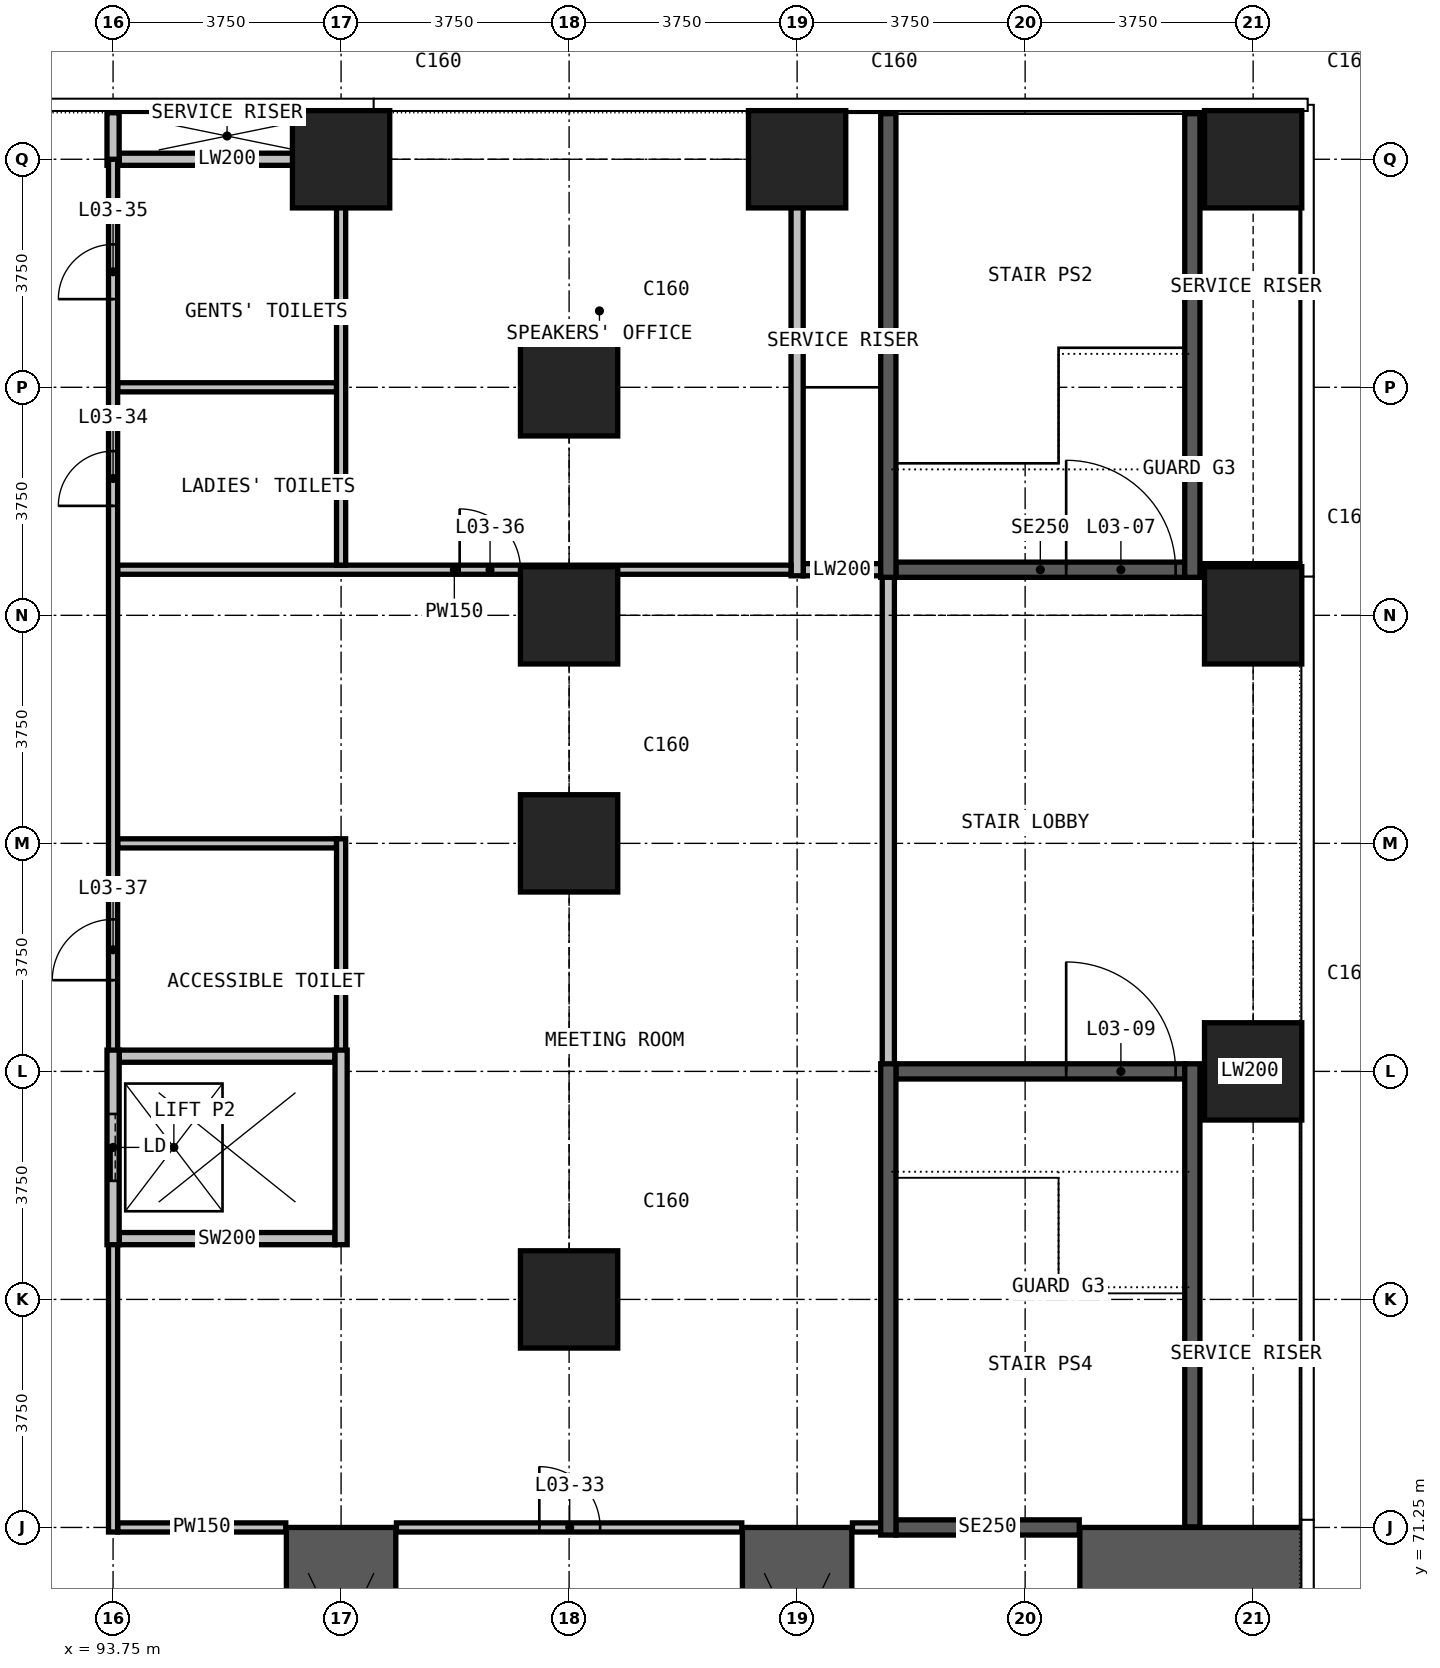
"""IFC4 building model, lengths in metres.
Left out: names, types, materials, properties, quantities, classifications, styles, units other than length and angle.
Written with IfcOpenShell. Run it as: python <this file> out.ifc"""

import sys

from ifc_helpers import new_model, si_unit, direction, frame, frame_2d, origin, origin_2d, place, context, subcontext, project, spatial, rectangle, extrude, element, fill, save


model = new_model("IFC4")
c1 = context("Model", 3, precision=1e-05, world=origin(), true_north=direction((0.0, 1.0)))
c2 = subcontext(c1, "Body", "Model", "MODEL_VIEW")
j1 = project(units=[si_unit("LENGTHUNIT", "METRE"), si_unit("PLANEANGLEUNIT", "RADIAN")], contexts=[c1])
p1 = place(None, origin())
s1 = spatial("IfcSite", under=j1, at=p1, CompositionType="ELEMENT")
p2 = place(p1, origin())
s2 = spatial("IfcBuilding", under=s1, at=p2, CompositionType="ELEMENT")
p3 = place(p2, frame((0.0, 0.0, 24.0)))
s3 = spatial("IfcBuildingStorey", under=s2, at=p3, CompositionType="ELEMENT", Elevation=24.0)
for number, where, z_axis, x_axis in (
    (1, (97.5, 67.5, 0.0), (0.0, 0.0, 1.0), (0.0, 1.0, 0.0)),
    (2, (105.0, 67.5, 0.0), (0.0, 0.0, 1.0), (0.0, 1.0, 0.0)),
):
    element("IfcWall", number, at=place(p3, frame(where, z_axis=z_axis, x_axis=x_axis)), inside=s3, PredefinedType="SHEAR", context=c2, shape_type="SweptSolid", body=[
        extrude(rectangle(XDim=3.75, YDim=1.8, at=frame_2d((1.875, 0.0))), origin(), (0.0, 0.0, 1.0), 6.0),
    ])
p4 = place(p3, frame((111.525, 67.5, 0.0), z_axis=(0.0, 0.0, 1.0), x_axis=(0.0, 1.0, 0.0)))
e3 = element("IfcWall", 3, at=p4, inside=s3, PredefinedType="SHEAR", context=c2, shape_type="SweptSolid", body=[
    extrude(rectangle(XDim=3.75, YDim=3.75, at=frame_2d((1.875, 0.0))), origin(), (0.0, 0.0, 1.0), 6.0),
])
for number, where, z_axis, x_axis in (
    (4, (97.5, 93.75, 0.0), (0.0, 0.0, 1.0), (1.0, 0.0, 0.0)),
    (5, (101.25, 75.0, 0.0), (0.0, 0.0, 1.0), (1.0, 0.0, 0.0)),
    (6, (101.25, 82.5, 0.0), (0.0, 0.0, 1.0), (1.0, 0.0, 0.0)),
    (7, (101.25, 86.25, 0.0), (0.0, 0.0, 1.0), (1.0, 0.0, 0.0)),
    (8, (101.25, 90.0, 0.0), (0.0, 0.0, 1.0), (1.0, 0.0, 0.0)),
    (9, (105.0, 93.75, 0.0), (0.0, 0.0, 1.0), (1.0, 0.0, 0.0)),
    (10, (112.5, 78.75, 0.0), (0.0, 0.0, 1.0), (1.0, 0.0, 0.0)),
    (11, (112.5, 86.25, 0.0), (0.0, 0.0, 1.0), (1.0, 0.0, 0.0)),
    (12, (112.5, 93.75, 0.0), (0.0, 0.0, 1.0), (1.0, 0.0, 0.0)),
):
    element("IfcColumn", number, at=place(p3, frame(where, z_axis=z_axis, x_axis=x_axis)), inside=s3, PredefinedType="COLUMN", context=c2, shape_type="SweptSolid", body=[
        extrude(rectangle(XDim=1.6, YDim=1.6, at=origin_2d()), origin(), (0.0, 0.0, 1.0), 6.0),
    ])
p5 = place(p3, frame((111.625, 78.75, 0.0), z_axis=(0.0, 0.0, 1.0), x_axis=(1.0, 0.0, 0.0)))
e13 = element("IfcWall", 13, at=p5, inside=s3, PredefinedType="PARTITIONING", context=c2, shape_type="SweptSolid", body=[
    extrude(rectangle(XDim=1.64, YDim=0.2, at=frame_2d((0.82, 0.0))), origin(), (0.0, 0.0, 1.0), 5.65),
])
p6 = place(p3, frame((105.1, 87.0, 0.0), z_axis=(0.0, 0.0, 1.0), x_axis=(1.0, 0.0, 0.0)))
e14 = element("IfcWall", 14, at=p6, inside=s3, PredefinedType="PARTITIONING", context=c2, shape_type="SweptSolid", body=[
    extrude(rectangle(XDim=1.275, YDim=0.2, at=frame_2d((0.637, 0.0))), origin(), (0.0, 0.0, 1.0), 5.65),
])
p7 = place(p3, frame((111.625, 87.0, 0.0), z_axis=(0.0, 0.0, 1.0), x_axis=(1.0, 0.0, 0.0)))
e15 = element("IfcWall", 15, at=p7, inside=s3, PredefinedType="PARTITIONING", context=c2, shape_type="SweptSolid", body=[
    extrude(rectangle(XDim=1.64, YDim=0.2, at=frame_2d((0.82, 0.0))), origin(), (0.0, 0.0, 1.0), 5.65),
])
p8 = place(p3, frame((93.85, 93.75, 0.0), z_axis=(0.0, 0.0, 1.0), x_axis=(1.0, 0.0, 0.0)))
e16 = element("IfcWall", 16, at=p8, inside=s3, PredefinedType="PARTITIONING", context=c2, shape_type="SweptSolid", body=[
    extrude(rectangle(XDim=3.55, YDim=0.2, at=frame_2d((1.775, 0.0))), origin(), (0.0, 0.0, 1.0), 5.65),
])
for number, where, z_axis, x_axis in (
    (17, (93.75, 93.65, 0.0), (0.0, 0.0, 1.0), (0.0, 1.0, 0.0)),
    (18, (97.5, 93.65, 0.0), (0.0, 0.0, 1.0), (0.0, 1.0, 0.0)),
):
    element("IfcWall", number, at=place(p3, frame(where, z_axis=z_axis, x_axis=x_axis)), inside=s3, PredefinedType="PARTITIONING", context=c2, shape_type="SweptSolid", body=[
        extrude(rectangle(XDim=0.865, YDim=0.2, at=frame_2d((0.433, 0.0))), origin(), (0.0, 0.0, 1.0), 5.65),
    ])
p9 = place(p3, frame((105.0, 86.9, 0.0), z_axis=(0.0, 0.0, 1.0), x_axis=(0.0, 1.0, 0.0)))
e19 = element("IfcWall", 19, at=p9, inside=s3, PredefinedType="PARTITIONING", context=c2, shape_type="SweptSolid", body=[
    extrude(rectangle(XDim=7.615, YDim=0.2, at=frame_2d((3.808, 0.0))), origin(), (0.0, 0.0, 1.0), 5.65),
])
p10 = place(p3, frame((106.5, 78.625, 0.0), z_axis=(0.0, 0.0, 1.0), x_axis=(0.0, 1.0, 0.0)))
e20 = element("IfcWall", 20, at=p10, inside=s3, PredefinedType="PARTITIONING", context=c2, shape_type="SweptSolid", body=[
    extrude(rectangle(XDim=8.5, YDim=0.2, at=frame_2d((4.25, 0.0))), origin(), (0.0, 0.0, 1.0), 5.65),
])
p11 = place(p3, frame((93.825, 71.25, 0.0), z_axis=(0.0, 0.0, 1.0), x_axis=(1.0, 0.0, 0.0)))
e21 = element("IfcWall", 21, at=p11, inside=s3, PredefinedType="PARTITIONING", context=c2, shape_type="SweptSolid", body=[
    extrude(rectangle(XDim=2.765, YDim=0.15, at=frame_2d((1.383, 0.0))), origin(), (0.0, 0.0, 1.0), 5.65),
])
p12 = place(p3, frame((98.41, 71.25, 0.0), z_axis=(0.0, 0.0, 1.0), x_axis=(1.0, 0.0, 0.0)))
e22 = element("IfcWall", 22, at=p12, inside=s3, PredefinedType="PARTITIONING", context=c2, shape_type="SweptSolid", body=[
    extrude(rectangle(XDim=5.68, YDim=0.15, at=frame_2d((2.84, 0.0))), origin(), (0.0, 0.0, 1.0), 5.65),
])
p13 = place(p12, frame((2.35, 0.0, 0.0)))
e23 = element("IfcOpeningElement", 23, at=p13, cuts=e22, PredefinedType="OPENING", context=c2, shape_type="SweptSolid", body=[
    extrude(rectangle(XDim=1.0, YDim=2.2, at=frame_2d((0.5, 1.1))), frame((0.0, 0.085, 0.0), z_axis=(0.0, -1.0, 0.0), x_axis=(1.0, 0.0, 0.0)), (0.0, 0.0, 1.0), 0.17),
])
p14 = place(p3, frame((105.91, 71.25, 0.0), z_axis=(0.0, 0.0, 1.0), x_axis=(1.0, 0.0, 0.0)))
e24 = element("IfcWall", 24, at=p14, inside=s3, PredefinedType="PARTITIONING", context=c2, shape_type="SweptSolid", body=[
    extrude(rectangle(XDim=0.465, YDim=0.15, at=frame_2d((0.232, 0.0))), origin(), (0.0, 0.0, 1.0), 5.65),
])
p15 = place(p3, frame((93.825, 82.5, 0.0), z_axis=(0.0, 0.0, 1.0), x_axis=(1.0, 0.0, 0.0)))
e25 = element("IfcWall", 25, at=p15, inside=s3, PredefinedType="PARTITIONING", context=c2, shape_type="SweptSolid", body=[
    extrude(rectangle(XDim=3.6, YDim=0.15, at=frame_2d((1.8, 0.0))), origin(), (0.0, 0.0, 1.0), 5.65),
])
p16 = place(p3, frame((93.825, 87.0, 0.0), z_axis=(0.0, 0.0, 1.0), x_axis=(1.0, 0.0, 0.0)))
e26 = element("IfcWall", 26, at=p16, inside=s3, PredefinedType="PARTITIONING", context=c2, shape_type="SweptSolid", body=[
    extrude(rectangle(XDim=11.075, YDim=0.15, at=frame_2d((5.538, 0.0))), origin(), (0.0, 0.0, 1.0), 5.65),
])
p17 = place(p16, frame((5.625, 0.0, 0.0)))
e27 = element("IfcOpeningElement", 27, at=p17, cuts=e26, PredefinedType="OPENING", context=c2, shape_type="SweptSolid", body=[
    extrude(rectangle(XDim=1.0, YDim=2.2, at=frame_2d((0.5, 1.1))), frame((0.0, 0.085, 0.0), z_axis=(0.0, -1.0, 0.0), x_axis=(1.0, 0.0, 0.0)), (0.0, 0.0, 1.0), 0.17),
])
p18 = place(p3, frame((93.825, 90.0, 0.0), z_axis=(0.0, 0.0, 1.0), x_axis=(1.0, 0.0, 0.0)))
e28 = element("IfcWall", 28, at=p18, inside=s3, PredefinedType="PARTITIONING", context=c2, shape_type="SweptSolid", body=[
    extrude(rectangle(XDim=3.6, YDim=0.15, at=frame_2d((1.8, 0.0))), origin(), (0.0, 0.0, 1.0), 5.65),
])
p19 = place(p3, frame((93.75, 71.175, 0.0), z_axis=(0.0, 0.0, 1.0), x_axis=(0.0, 1.0, 0.0)))
e29 = element("IfcWall", 29, at=p19, inside=s3, PredefinedType="PARTITIONING", context=c2, shape_type="SweptSolid", body=[
    extrude(rectangle(XDim=4.925, YDim=0.15, at=frame_2d((2.462, 0.0))), origin(), (0.0, 0.0, 1.0), 5.65),
])
p20 = place(p3, frame((93.75, 78.9, 0.0), z_axis=(0.0, 0.0, 1.0), x_axis=(0.0, 1.0, 0.0)))
e30 = element("IfcWall", 30, at=p20, inside=s3, PredefinedType="PARTITIONING", context=c2, shape_type="SweptSolid", body=[
    extrude(rectangle(XDim=14.85, YDim=0.15, at=frame_2d((7.425, 0.0))), origin(), (0.0, 0.0, 1.0), 5.65),
])
p21 = place(p20, frame((9.15, 0.0, 0.0)))
e31 = element("IfcOpeningElement", 31, at=p21, cuts=e30, PredefinedType="OPENING", context=c2, shape_type="SweptSolid", body=[
    extrude(rectangle(XDim=0.9, YDim=2.2, at=frame_2d((0.45, 1.1))), frame((0.0, 0.085, 0.0), z_axis=(0.0, -1.0, 0.0), x_axis=(1.0, 0.0, 0.0)), (0.0, 0.0, 1.0), 0.17),
])
p22 = place(p20, frame((12.55, 0.0, 0.0)))
e32 = element("IfcOpeningElement", 32, at=p22, cuts=e30, PredefinedType="OPENING", context=c2, shape_type="SweptSolid", body=[
    extrude(rectangle(XDim=0.9, YDim=2.2, at=frame_2d((0.45, 1.1))), frame((0.0, 0.085, 0.0), z_axis=(0.0, -1.0, 0.0), x_axis=(1.0, 0.0, 0.0)), (0.0, 0.0, 1.0), 0.17),
])
p23 = place(p20, frame((1.35, 0.0, 0.0)))
e33 = element("IfcOpeningElement", 33, at=p23, cuts=e30, PredefinedType="OPENING", context=c2, shape_type="SweptSolid", body=[
    extrude(rectangle(XDim=1.0, YDim=2.2, at=frame_2d((0.5, 1.1))), frame((0.0, 0.085, 0.0), z_axis=(0.0, -1.0, 0.0), x_axis=(1.0, 0.0, 0.0)), (0.0, 0.0, 1.0), 0.17),
])
p24 = place(p3, frame((97.5, 78.9, 0.0), z_axis=(0.0, 0.0, 1.0), x_axis=(0.0, 1.0, 0.0)))
e34 = element("IfcWall", 34, at=p24, inside=s3, PredefinedType="PARTITIONING", context=c2, shape_type="SweptSolid", body=[
    extrude(rectangle(XDim=3.675, YDim=0.15, at=frame_2d((1.837, 0.0))), origin(), (0.0, 0.0, 1.0), 5.65),
])
p25 = place(p3, frame((97.5, 87.075, 0.0), z_axis=(0.0, 0.0, 1.0), x_axis=(0.0, 1.0, 0.0)))
e35 = element("IfcWall", 35, at=p25, inside=s3, PredefinedType="PARTITIONING", context=c2, shape_type="SweptSolid", body=[
    extrude(rectangle(XDim=6.675, YDim=0.15, at=frame_2d((3.337, 0.0))), origin(), (0.0, 0.0, 1.0), 5.65),
])
for number, where, z_axis, x_axis in (
    (36, (93.85, 76.0, 0.0), (0.0, 0.0, 1.0), (1.0, 0.0, 0.0)),
    (37, (93.85, 79.0, 0.0), (0.0, 0.0, 1.0), (1.0, 0.0, 0.0)),
):
    element("IfcWall", number, at=place(p3, frame(where, z_axis=z_axis, x_axis=x_axis)), inside=s3, PredefinedType="PARTITIONING", context=c2, shape_type="SweptSolid", body=[
        extrude(rectangle(XDim=3.55, YDim=0.2, at=frame_2d((1.775, 0.0))), origin(), (0.0, 0.0, 1.0), 5.65),
    ])
p26 = place(p3, frame((93.75, 75.9, 0.0), z_axis=(0.0, 0.0, 1.0), x_axis=(0.0, 1.0, 0.0)))
e38 = element("IfcWall", 38, at=p26, inside=s3, PredefinedType="PARTITIONING", context=c2, shape_type="SweptSolid", body=[
    extrude(rectangle(XDim=3.2, YDim=0.2, at=frame_2d((1.6, 0.0))), origin(), (0.0, 0.0, 1.0), 5.65),
])
p27 = place(p26, frame((1.05, 0.0, 0.0)))
e39 = element("IfcOpeningElement", 39, at=p27, cuts=e38, PredefinedType="OPENING", context=c2, shape_type="SweptSolid", body=[
    extrude(rectangle(XDim=1.1, YDim=2.2, at=frame_2d((0.55, 1.1))), frame((0.0, 0.11, 0.0), z_axis=(0.0, -1.0, 0.0), x_axis=(1.0, 0.0, 0.0)), (0.0, 0.0, 1.0), 0.22),
])
p28 = place(p3, frame((97.5, 75.9, 0.0), z_axis=(0.0, 0.0, 1.0), x_axis=(0.0, 1.0, 0.0)))
e40 = element("IfcWall", 40, at=p28, inside=s3, PredefinedType="PARTITIONING", context=c2, shape_type="SweptSolid", body=[
    extrude(rectangle(XDim=3.2, YDim=0.2, at=frame_2d((1.6, 0.0))), origin(), (0.0, 0.0, 1.0), 5.65),
])
p29 = place(p3, frame((106.625, 71.25, 0.0), z_axis=(0.0, 0.0, 1.0), x_axis=(1.0, 0.0, 0.0)))
e41 = element("IfcWall", 41, at=p29, inside=s3, PredefinedType="PARTITIONING", context=c2, shape_type="SweptSolid", body=[
    extrude(rectangle(XDim=3.015, YDim=0.25, at=frame_2d((1.507, 0.0))), origin(), (0.0, 0.0, 1.0), 5.65),
])
p30 = place(p3, frame((106.625, 78.75, 0.0), z_axis=(0.0, 0.0, 1.0), x_axis=(1.0, 0.0, 0.0)))
e42 = element("IfcWall", 42, at=p30, inside=s3, PredefinedType="PARTITIONING", context=c2, shape_type="SweptSolid", body=[
    extrude(rectangle(XDim=4.75, YDim=0.25, at=frame_2d((2.375, 0.0))), origin(), (0.0, 0.0, 1.0), 5.65),
])
p31 = place(p30, frame((2.8, 0.0, 0.0)))
e43 = element("IfcOpeningElement", 43, at=p31, cuts=e42, PredefinedType="OPENING", context=c2, shape_type="SweptSolid", body=[
    extrude(rectangle(XDim=1.8, YDim=2.2, at=frame_2d((0.9, 1.1))), frame((0.0, 0.135, 0.0), z_axis=(0.0, -1.0, 0.0), x_axis=(1.0, 0.0, 0.0)), (0.0, 0.0, 1.0), 0.27),
])
p32 = place(p3, frame((106.625, 87.0, 0.0), z_axis=(0.0, 0.0, 1.0), x_axis=(1.0, 0.0, 0.0)))
e44 = element("IfcWall", 44, at=p32, inside=s3, PredefinedType="PARTITIONING", context=c2, shape_type="SweptSolid", body=[
    extrude(rectangle(XDim=4.75, YDim=0.25, at=frame_2d((2.375, 0.0))), origin(), (0.0, 0.0, 1.0), 5.65),
])
p33 = place(p32, frame((2.8, 0.0, 0.0)))
e45 = element("IfcOpeningElement", 45, at=p33, cuts=e44, PredefinedType="OPENING", context=c2, shape_type="SweptSolid", body=[
    extrude(rectangle(XDim=1.8, YDim=2.2, at=frame_2d((0.9, 1.1))), frame((0.0, 0.135, 0.0), z_axis=(0.0, -1.0, 0.0), x_axis=(1.0, 0.0, 0.0)), (0.0, 0.0, 1.0), 0.27),
])
p34 = place(p3, frame((106.5, 71.125, 0.0), z_axis=(0.0, 0.0, 1.0), x_axis=(0.0, 1.0, 0.0)))
e46 = element("IfcWall", 46, at=p34, inside=s3, PredefinedType="PARTITIONING", context=c2, shape_type="SweptSolid", body=[
    extrude(rectangle(XDim=7.75, YDim=0.25, at=frame_2d((3.875, 0.0))), origin(), (0.0, 0.0, 1.0), 5.65),
])
p35 = place(p3, frame((106.5, 86.875, 0.0), z_axis=(0.0, 0.0, 1.0), x_axis=(0.0, 1.0, 0.0)))
e47 = element("IfcWall", 47, at=p35, inside=s3, PredefinedType="PARTITIONING", context=c2, shape_type="SweptSolid", body=[
    extrude(rectangle(XDim=7.625, YDim=0.25, at=frame_2d((3.812, 0.0))), origin(), (0.0, 0.0, 1.0), 5.65),
])
p36 = place(p3, frame((111.5, 71.26, 0.0), z_axis=(0.0, 0.0, 1.0), x_axis=(0.0, 1.0, 0.0)))
e48 = element("IfcWall", 48, at=p36, inside=s3, PredefinedType="PARTITIONING", context=c2, shape_type="SweptSolid", body=[
    extrude(rectangle(XDim=7.615, YDim=0.25, at=frame_2d((3.808, 0.0))), origin(), (0.0, 0.0, 1.0), 5.65),
])
p37 = place(p3, frame((111.5, 86.875, 0.0), z_axis=(0.0, 0.0, 1.0), x_axis=(0.0, 1.0, 0.0)))
e49 = element("IfcWall", 49, at=p37, inside=s3, PredefinedType="PARTITIONING", context=c2, shape_type="SweptSolid", body=[
    extrude(rectangle(XDim=7.625, YDim=0.25, at=frame_2d((3.812, 0.0))), origin(), (0.0, 0.0, 1.0), 5.65),
])
p38 = place(p33, origin())
e50 = element("IfcDoor", 50, at=p38, inside=s3, OperationType="DOUBLE_DOOR_SINGLE_SWING", PredefinedType="DOOR", context=c2, shape_type="SweptSolid", body=[
    extrude(rectangle(XDim=1.8, YDim=2.2, at=frame_2d((0.9, 1.1))), frame((0.0, 0.025, 0.0), z_axis=(0.0, -1.0, 0.0), x_axis=(1.0, 0.0, 0.0)), (0.0, 0.0, 1.0), 0.05),
])
fill(e45, e50)
p39 = place(p31, origin())
e51 = element("IfcDoor", 51, at=p39, inside=s3, OperationType="DOUBLE_DOOR_SINGLE_SWING", PredefinedType="DOOR", context=c2, shape_type="SweptSolid", body=[
    extrude(rectangle(XDim=1.8, YDim=2.2, at=frame_2d((0.9, 1.1))), frame((0.0, 0.025, 0.0), z_axis=(0.0, -1.0, 0.0), x_axis=(1.0, 0.0, 0.0)), (0.0, 0.0, 1.0), 0.05),
])
fill(e43, e51)
p40 = place(p27, origin())
e52 = element("IfcDoor", 52, at=p40, inside=s3, OperationType="DOUBLE_DOOR_SLIDING", PredefinedType="DOOR", context=c2, shape_type="SweptSolid", body=[
    extrude(rectangle(XDim=1.1, YDim=2.2, at=frame_2d((0.55, 1.1))), frame((0.0, 0.025, 0.0), z_axis=(0.0, -1.0, 0.0), x_axis=(1.0, 0.0, 0.0)), (0.0, 0.0, 1.0), 0.05),
])
fill(e39, e52)
p41 = place(p13, origin())
e53 = element("IfcDoor", 53, at=p41, inside=s3, OperationType="SINGLE_SWING_LEFT", PredefinedType="DOOR", context=c2, shape_type="SweptSolid", body=[
    extrude(rectangle(XDim=1.0, YDim=2.2, at=frame_2d((0.5, 1.1))), frame((0.0, 0.025, 0.0), z_axis=(0.0, -1.0, 0.0), x_axis=(1.0, 0.0, 0.0)), (0.0, 0.0, 1.0), 0.05),
])
fill(e23, e53)
p42 = place(p21, origin())
e54 = element("IfcDoor", 54, at=p42, inside=s3, OperationType="SINGLE_SWING_RIGHT", PredefinedType="DOOR", context=c2, shape_type="SweptSolid", body=[
    extrude(rectangle(XDim=0.9, YDim=2.2, at=frame_2d((0.45, 1.1))), frame((0.0, 0.025, 0.0), z_axis=(0.0, -1.0, 0.0), x_axis=(1.0, 0.0, 0.0)), (0.0, 0.0, 1.0), 0.05),
])
fill(e31, e54)
p43 = place(p22, origin())
e55 = element("IfcDoor", 55, at=p43, inside=s3, OperationType="SINGLE_SWING_LEFT", PredefinedType="DOOR", context=c2, shape_type="SweptSolid", body=[
    extrude(rectangle(XDim=0.9, YDim=2.2, at=frame_2d((0.45, 1.1))), frame((0.0, 0.025, 0.0), z_axis=(0.0, -1.0, 0.0), x_axis=(1.0, 0.0, 0.0)), (0.0, 0.0, 1.0), 0.05),
])
fill(e32, e55)
p44 = place(p17, origin())
e56 = element("IfcDoor", 56, at=p44, inside=s3, OperationType="SINGLE_SWING_LEFT", PredefinedType="DOOR", context=c2, shape_type="SweptSolid", body=[
    extrude(rectangle(XDim=1.0, YDim=2.2, at=frame_2d((0.5, 1.1))), frame((0.0, 0.025, 0.0), z_axis=(0.0, -1.0, 0.0), x_axis=(1.0, 0.0, 0.0)), (0.0, 0.0, 1.0), 0.05),
])
fill(e27, e56)
p45 = place(p23, origin())
e57 = element("IfcDoor", 57, at=p45, inside=s3, OperationType="SINGLE_SWING_LEFT", PredefinedType="DOOR", context=c2, shape_type="SweptSolid", body=[
    extrude(rectangle(XDim=1.0, YDim=2.2, at=frame_2d((0.5, 1.1))), frame((0.0, 0.025, 0.0), z_axis=(0.0, -1.0, 0.0), x_axis=(1.0, 0.0, 0.0)), (0.0, 0.0, 1.0), 0.05),
])
fill(e33, e57)
save(model, sys.argv[1])
